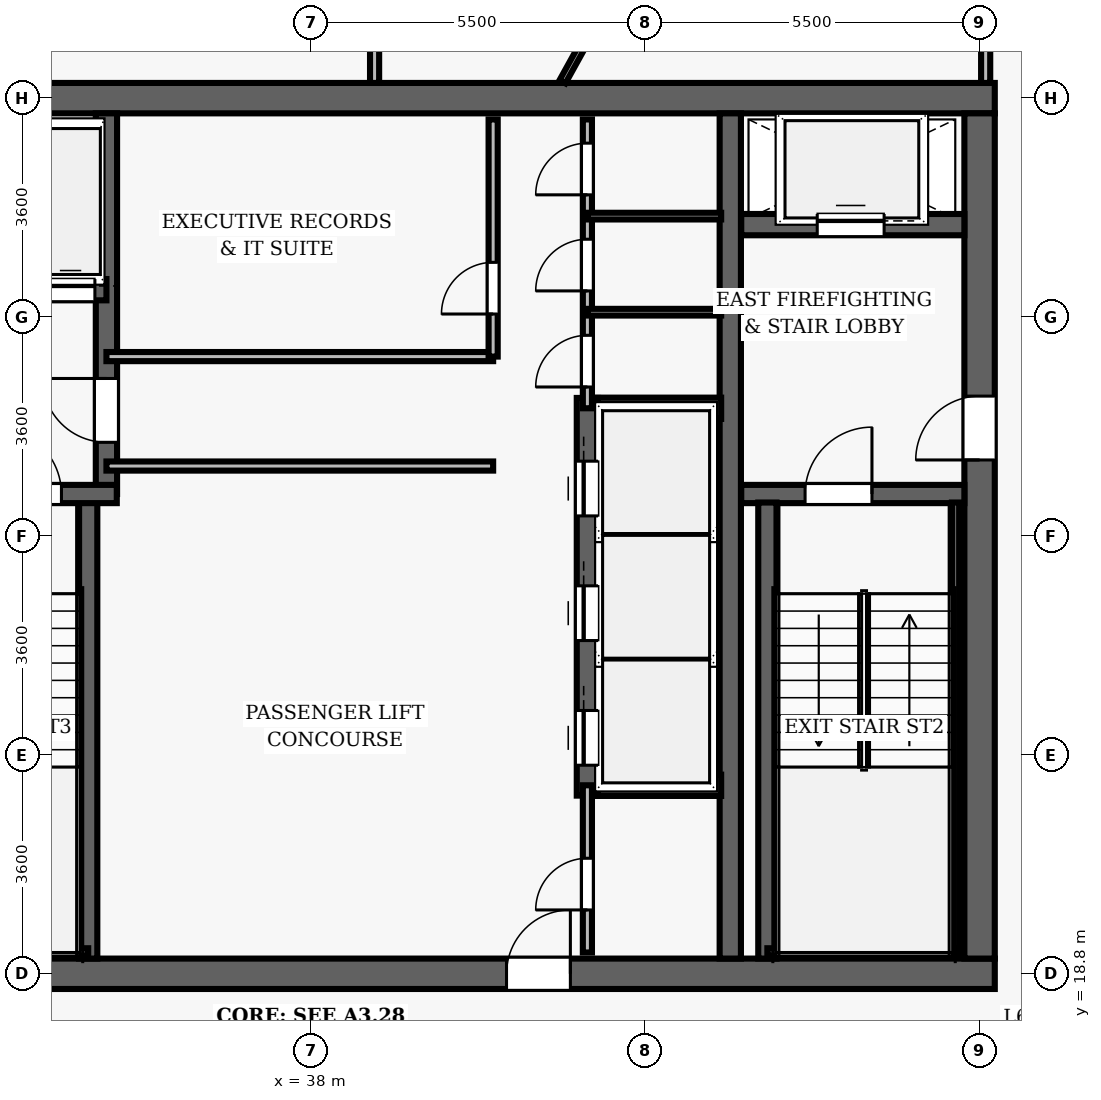
"""IFC4 building model, lengths in metres.
Left out: names, types, materials, properties, quantities, classifications, styles, units other than length and angle.
Written with IfcOpenShell. Run it as: python <this file> out.ifc"""

import sys

from ifc_helpers import new_model, si_unit, direction, frame, frame_2d, origin, place, context, subcontext, project, spatial, rectangle, extrude, element, fill, save


model = new_model("IFC4")
c1 = context("Model", 3, precision=1e-05, world=origin(), true_north=direction((0.0, 1.0)))
c2 = subcontext(c1, "Body", "Model", "MODEL_VIEW")
j1 = project(units=[si_unit("LENGTHUNIT", "METRE"), si_unit("PLANEANGLEUNIT", "RADIAN")], contexts=[c1])
p1 = place(None, origin())
s1 = spatial("IfcSite", under=j1, at=p1, CompositionType="ELEMENT")
p2 = place(p1, origin())
s2 = spatial("IfcBuilding", under=s1, at=p2, CompositionType="ELEMENT")
p3 = place(p2, frame((0.0, 0.0, 257.45)))
s3 = spatial("IfcBuildingStorey", under=s2, at=p3, CompositionType="ELEMENT", Elevation=257.45)
p4 = place(p3, frame((26.75, 18.8, 0.0), z_axis=(0.0, 0.0, 1.0), x_axis=(1.0, 0.0, 0.0)))
e1 = element("IfcWall", 1, at=p4, inside=s3, PredefinedType="SHEAR", context=c2, shape_type="SweptSolid", body=[
    extrude(rectangle(XDim=22.5, YDim=0.5, at=frame_2d((11.25, 0.0))), origin(), (0.0, 0.0, 1.0), 3.85),
])
p5 = place(p4, frame((14.47, 0.0, 0.0)))
e2 = element("IfcOpeningElement", 2, at=p5, cuts=e1, PredefinedType="OPENING", context=c2, shape_type="SweptSolid", body=[
    extrude(rectangle(XDim=1.05, YDim=2.15, at=frame_2d((0.525, 1.075))), frame((0.0, 0.26, 0.0), z_axis=(0.0, -1.0, 0.0), x_axis=(1.0, 0.0, 0.0)), (0.0, 0.0, 1.0), 0.52),
])
p6 = place(p3, frame((26.75, 33.2, 0.0), z_axis=(0.0, 0.0, 1.0), x_axis=(1.0, 0.0, 0.0)))
e3 = element("IfcWall", 3, at=p6, inside=s3, PredefinedType="SHEAR", context=c2, shape_type="SweptSolid", body=[
    extrude(rectangle(XDim=22.5, YDim=0.5, at=frame_2d((11.25, 0.0))), origin(), (0.0, 0.0, 1.0), 3.85),
])
p7 = place(p3, frame((49.0, 19.05, 0.0), z_axis=(0.0, 0.0, 1.0), x_axis=(0.0, 1.0, 0.0)))
e4 = element("IfcWall", 4, at=p7, inside=s3, PredefinedType="SHEAR", context=c2, shape_type="SweptSolid", body=[
    extrude(rectangle(XDim=13.9, YDim=0.5, at=frame_2d((6.95, 0.0))), origin(), (0.0, 0.0, 1.0), 3.85),
])
p8 = place(p7, frame((8.2, 0.0, 0.0)))
e5 = element("IfcOpeningElement", 5, at=p8, cuts=e4, PredefinedType="OPENING", context=c2, shape_type="SweptSolid", body=[
    extrude(rectangle(XDim=1.05, YDim=2.15, at=frame_2d((0.525, 1.075))), frame((0.0, 0.26, 0.0), z_axis=(0.0, -1.0, 0.0), x_axis=(1.0, 0.0, 0.0)), (0.0, 0.0, 1.0), 0.52),
])
p9 = place(p3, frame((44.9, 19.05, 0.0), z_axis=(0.0, 0.0, 1.0), x_axis=(0.0, 1.0, 0.0)))
e6 = element("IfcWall", 6, at=p9, inside=s3, PredefinedType="SHEAR", context=c2, shape_type="SweptSolid", body=[
    extrude(rectangle(XDim=13.9, YDim=0.35, at=frame_2d((6.95, 0.0))), origin(), (0.0, 0.0, 1.0), 3.85),
])
p10 = place(p3, frame((45.08, 26.69, 0.0), z_axis=(0.0, 0.0, 1.0), x_axis=(1.0, 0.0, 0.0)))
e7 = element("IfcWall", 7, at=p10, inside=s3, PredefinedType="SHEAR", context=c2, shape_type="SweptSolid", body=[
    extrude(rectangle(XDim=3.67, YDim=0.3, at=frame_2d((1.835, 0.0))), origin(), (0.0, 0.0, 1.0), 3.85),
])
p11 = place(p10, frame((1.05, 0.0, 0.0)))
e8 = element("IfcOpeningElement", 8, at=p11, cuts=e7, PredefinedType="OPENING", context=c2, shape_type="SweptSolid", body=[
    extrude(rectangle(XDim=1.1, YDim=2.15, at=frame_2d((0.55, 1.075))), frame((0.0, 0.16, 0.0), z_axis=(0.0, -1.0, 0.0), x_axis=(1.0, 0.0, 0.0)), (0.0, 0.0, 1.0), 0.32),
])
p12 = place(p3, frame((45.51, 19.05, 0.0), z_axis=(0.0, 0.0, 1.0), x_axis=(0.0, 1.0, 0.0)))
e9 = element("IfcWall", 9, at=p12, inside=s3, PredefinedType="SHEAR", context=c2, shape_type="SweptSolid", body=[
    extrude(rectangle(XDim=7.5, YDim=0.3, at=frame_2d((3.75, 0.0))), origin(), (0.0, 0.0, 1.0), 3.85),
])
p13 = place(p3, frame((48.605, 19.1, 0.0), z_axis=(0.0, 0.0, 1.0), x_axis=(0.0, 1.0, 0.0)))
e10 = element("IfcWall", 10, at=p13, inside=s3, PredefinedType="SHEAR", context=c2, shape_type="SweptSolid", body=[
    extrude(rectangle(XDim=7.45, YDim=0.12, at=frame_2d((3.725, 0.0))), origin(), (0.0, 0.0, 1.0), 3.85),
])
p14 = place(p3, frame((45.51, 19.16, 0.0), z_axis=(0.0, 0.0, 1.0), x_axis=(1.0, 0.0, 0.0)))
e11 = element("IfcWall", 11, at=p14, inside=s3, PredefinedType="SHEAR", context=c2, shape_type="SweptSolid", body=[
    extrude(rectangle(XDim=3.095, YDim=0.12, at=frame_2d((1.547, 0.0))), origin(), (0.0, 0.0, 1.0), 3.85),
])
p15 = place(p3, frame((45.08, 31.12, 0.0), z_axis=(0.0, 0.0, 1.0), x_axis=(1.0, 0.0, 0.0)))
e12 = element("IfcWall", 12, at=p15, inside=s3, PredefinedType="SHEAR", context=c2, shape_type="SweptSolid", body=[
    extrude(rectangle(XDim=3.67, YDim=0.35, at=frame_2d((1.835, 0.0))), origin(), (0.0, 0.0, 1.0), 3.04),
])
p16 = place(p15, frame((1.25, 0.0, 0.0)))
e13 = element("IfcOpeningElement", 13, at=p16, cuts=e12, PredefinedType="OPENING", context=c2, shape_type="SweptSolid", body=[
    extrude(rectangle(XDim=1.1, YDim=2.15, at=frame_2d((0.55, 1.075))), frame((0.0, 0.185, 0.0), z_axis=(0.0, -1.0, 0.0), x_axis=(1.0, 0.0, 0.0)), (0.0, 0.0, 1.0), 0.37),
])
p17 = place(p3, frame((34.34, 19.05, 0.0), z_axis=(0.0, 0.0, 1.0), x_axis=(0.0, 1.0, 0.0)))
e14 = element("IfcWall", 14, at=p17, inside=s3, PredefinedType="SHEAR", context=c2, shape_type="SweptSolid", body=[
    extrude(rectangle(XDim=7.5, YDim=0.3, at=frame_2d((3.75, 0.0))), origin(), (0.0, 0.0, 1.0), 3.85),
])
p18 = place(p3, frame((34.64, 26.69, 0.0), z_axis=(0.0, 0.0, 1.0), x_axis=(0.0, 1.0, 0.0)))
e15 = element("IfcWall", 15, at=p18, inside=s3, PredefinedType="SHEAR", context=c2, shape_type="SweptSolid", body=[
    extrude(rectangle(XDim=6.26, YDim=0.35, at=frame_2d((3.13, 0.0))), origin(), (0.0, 0.0, 1.0), 3.85),
])
p19 = place(p18, frame((0.85, 0.0, 0.0)))
e16 = element("IfcOpeningElement", 16, at=p19, cuts=e15, PredefinedType="OPENING", context=c2, shape_type="SweptSolid", body=[
    extrude(rectangle(XDim=1.05, YDim=2.15, at=frame_2d((0.525, 1.075))), frame((0.0, 0.185, 0.0), z_axis=(0.0, -1.0, 0.0), x_axis=(1.0, 0.0, 0.0)), (0.0, 0.0, 1.0), 0.37),
])
p20 = place(p3, frame((31.25, 26.69, 0.0), z_axis=(0.0, 0.0, 1.0), x_axis=(1.0, 0.0, 0.0)))
e17 = element("IfcWall", 17, at=p20, inside=s3, PredefinedType="SHEAR", context=c2, shape_type="SweptSolid", body=[
    extrude(rectangle(XDim=3.56, YDim=0.3, at=frame_2d((1.78, 0.0))), origin(), (0.0, 0.0, 1.0), 3.85),
])
p21 = place(p20, frame((1.55, 0.0, 0.0)))
e18 = element("IfcOpeningElement", 18, at=p21, cuts=e17, PredefinedType="OPENING", context=c2, shape_type="SweptSolid", body=[
    extrude(rectangle(XDim=1.1, YDim=2.15, at=frame_2d((0.55, 1.075))), frame((0.0, 0.16, 0.0), z_axis=(0.0, -1.0, 0.0), x_axis=(1.0, 0.0, 0.0)), (0.0, 0.0, 1.0), 0.32),
])
p22 = place(p3, frame((31.3, 19.16, 0.0), z_axis=(0.0, 0.0, 1.0), x_axis=(1.0, 0.0, 0.0)))
e19 = element("IfcWall", 19, at=p22, inside=s3, PredefinedType="SHEAR", context=c2, shape_type="SweptSolid", body=[
    extrude(rectangle(XDim=3.04, YDim=0.12, at=frame_2d((1.52, 0.0))), origin(), (0.0, 0.0, 1.0), 3.85),
])
p23 = place(p3, frame((32.23, 30.05, 0.0), z_axis=(0.0, 0.0, 1.0), x_axis=(1.0, 0.0, 0.0)))
e20 = element("IfcWall", 20, at=p23, inside=s3, PredefinedType="SHEAR", context=c2, shape_type="SweptSolid", body=[
    extrude(rectangle(XDim=2.41, YDim=0.35, at=frame_2d((1.205, 0.0))), origin(), (0.0, 0.0, 1.0), 3.04),
])
p24 = place(p23, frame((0.42, 0.0, 0.0)))
e21 = element("IfcOpeningElement", 21, at=p24, cuts=e20, PredefinedType="OPENING", context=c2, shape_type="SweptSolid", body=[
    extrude(rectangle(XDim=0.8, YDim=2.15, at=frame_2d((0.4, 1.075))), frame((0.0, 0.185, 0.0), z_axis=(0.0, -1.0, 0.0), x_axis=(1.0, 0.0, 0.0)), (0.0, 0.0, 1.0), 0.37),
])
p25 = place(p23, frame((1.42, 0.0, 0.0)))
e22 = element("IfcOpeningElement", 22, at=p25, cuts=e20, PredefinedType="OPENING", context=c2, shape_type="SweptSolid", body=[
    extrude(rectangle(XDim=0.8, YDim=2.15, at=frame_2d((0.4, 1.075))), frame((0.0, 0.185, 0.0), z_axis=(0.0, -1.0, 0.0), x_axis=(1.0, 0.0, 0.0)), (0.0, 0.0, 1.0), 0.37),
])
p26 = place(p3, frame((42.55, 21.73, 0.0), z_axis=(0.0, 0.0, 1.0), x_axis=(0.0, 1.0, 0.0)))
e23 = element("IfcWall", 23, at=p26, inside=s3, PredefinedType="SHEAR", context=c2, shape_type="SweptSolid", body=[
    extrude(rectangle(XDim=6.54, YDim=0.35, at=frame_2d((3.27, 0.0))), origin(), (0.0, 0.0, 1.0), 3.04),
])
p27 = place(p26, frame((0.5, 0.0, 0.0)))
e24 = element("IfcOpeningElement", 24, at=p27, cuts=e23, PredefinedType="OPENING", context=c2, shape_type="SweptSolid", body=[
    extrude(rectangle(XDim=0.9, YDim=2.15, at=frame_2d((0.45, 1.075))), frame((0.0, 0.185, 0.0), z_axis=(0.0, -1.0, 0.0), x_axis=(1.0, 0.0, 0.0)), (0.0, 0.0, 1.0), 0.37),
])
p28 = place(p26, frame((2.55, 0.0, 0.0)))
e25 = element("IfcOpeningElement", 25, at=p28, cuts=e23, PredefinedType="OPENING", context=c2, shape_type="SweptSolid", body=[
    extrude(rectangle(XDim=0.9, YDim=2.15, at=frame_2d((0.45, 1.075))), frame((0.0, 0.185, 0.0), z_axis=(0.0, -1.0, 0.0), x_axis=(1.0, 0.0, 0.0)), (0.0, 0.0, 1.0), 0.37),
])
p29 = place(p26, frame((4.6, 0.0, 0.0)))
e26 = element("IfcOpeningElement", 26, at=p29, cuts=e23, PredefinedType="OPENING", context=c2, shape_type="SweptSolid", body=[
    extrude(rectangle(XDim=0.9, YDim=2.15, at=frame_2d((0.45, 1.075))), frame((0.0, 0.185, 0.0), z_axis=(0.0, -1.0, 0.0), x_axis=(1.0, 0.0, 0.0)), (0.0, 0.0, 1.0), 0.37),
])
for number, where, z_axis, x_axis in (
    (27, (42.72, 21.9, 0.0), (0.0, 0.0, 1.0), (1.0, 0.0, 0.0)),
    (28, (42.72, 28.1, 0.0), (0.0, 0.0, 1.0), (1.0, 0.0, 0.0)),
):
    element("IfcWall", number, at=place(p3, frame(where, z_axis=z_axis, x_axis=x_axis)), inside=s3, PredefinedType="SHEAR", context=c2, shape_type="SweptSolid", body=[
        extrude(rectangle(XDim=2.03, YDim=0.35, at=frame_2d((1.015, 0.0))), origin(), (0.0, 0.0, 1.0), 3.04),
    ])
for number, where, z_axis, x_axis in (
    (29, (34.64, 27.15, 0.0), (0.0, 0.0, 1.0), (1.0, 0.0, 0.0)),
    (30, (34.64, 28.95, 0.0), (0.0, 0.0, 1.0), (1.0, 0.0, 0.0)),
):
    element("IfcWall", number, at=place(p3, frame(where, z_axis=z_axis, x_axis=x_axis)), inside=s3, PredefinedType="PARTITIONING", context=c2, shape_type="SweptSolid", body=[
        extrude(rectangle(XDim=6.36, YDim=0.15, at=frame_2d((3.18, 0.0))), origin(), (0.0, 0.0, 1.0), 3.04),
    ])
p30 = place(p3, frame((41.0, 28.95, 0.0), z_axis=(0.0, 0.0, 1.0), x_axis=(0.0, 1.0, 0.0)))
e31 = element("IfcWall", 31, at=p30, inside=s3, PredefinedType="PARTITIONING", context=c2, shape_type="SweptSolid", body=[
    extrude(rectangle(XDim=3.9, YDim=0.15, at=frame_2d((1.95, 0.0))), origin(), (0.0, 0.0, 1.0), 3.04),
])
p31 = place(p30, frame((0.7, 0.0, 0.0)))
e32 = element("IfcOpeningElement", 32, at=p31, cuts=e31, PredefinedType="OPENING", context=c2, shape_type="SweptSolid", body=[
    extrude(rectangle(XDim=0.85, YDim=2.1, at=frame_2d((0.425, 1.05))), frame((0.0, 0.085, 0.0), z_axis=(0.0, -1.0, 0.0), x_axis=(1.0, 0.0, 0.0)), (0.0, 0.0, 1.0), 0.17),
])
p32 = place(p3, frame((42.55, 28.1, 0.0), z_axis=(0.0, 0.0, 1.0), x_axis=(0.0, 1.0, 0.0)))
e33 = element("IfcWall", 33, at=p32, inside=s3, PredefinedType="PARTITIONING", context=c2, shape_type="SweptSolid", body=[
    extrude(rectangle(XDim=4.75, YDim=0.15, at=frame_2d((2.375, 0.0))), origin(), (0.0, 0.0, 1.0), 3.04),
])
p33 = place(p32, frame((0.35, 0.0, 0.0)))
e34 = element("IfcOpeningElement", 34, at=p33, cuts=e33, PredefinedType="OPENING", context=c2, shape_type="SweptSolid", body=[
    extrude(rectangle(XDim=0.85, YDim=2.1, at=frame_2d((0.425, 1.05))), frame((0.0, 0.085, 0.0), z_axis=(0.0, -1.0, 0.0), x_axis=(1.0, 0.0, 0.0)), (0.0, 0.0, 1.0), 0.17),
])
p34 = place(p32, frame((1.93, 0.0, 0.0)))
e35 = element("IfcOpeningElement", 35, at=p34, cuts=e33, PredefinedType="OPENING", context=c2, shape_type="SweptSolid", body=[
    extrude(rectangle(XDim=0.85, YDim=2.1, at=frame_2d((0.425, 1.05))), frame((0.0, 0.085, 0.0), z_axis=(0.0, -1.0, 0.0), x_axis=(1.0, 0.0, 0.0)), (0.0, 0.0, 1.0), 0.17),
])
p35 = place(p32, frame((3.51, 0.0, 0.0)))
e36 = element("IfcOpeningElement", 36, at=p35, cuts=e33, PredefinedType="OPENING", context=c2, shape_type="SweptSolid", body=[
    extrude(rectangle(XDim=0.85, YDim=2.1, at=frame_2d((0.425, 1.05))), frame((0.0, 0.085, 0.0), z_axis=(0.0, -1.0, 0.0), x_axis=(1.0, 0.0, 0.0)), (0.0, 0.0, 1.0), 0.17),
])
for number, where, z_axis, x_axis in (
    (37, (42.55, 29.68, 0.0), (0.0, 0.0, 1.0), (1.0, 0.0, 0.0)),
    (38, (42.55, 31.26, 0.0), (0.0, 0.0, 1.0), (1.0, 0.0, 0.0)),
):
    element("IfcWall", number, at=place(p3, frame(where, z_axis=z_axis, x_axis=x_axis)), inside=s3, PredefinedType="PARTITIONING", context=c2, shape_type="SweptSolid", body=[
        extrude(rectangle(XDim=2.2, YDim=0.11, at=frame_2d((1.1, 0.0))), origin(), (0.0, 0.0, 1.0), 3.04),
    ])
p36 = place(p3, frame((42.55, 19.15, 0.0), z_axis=(0.0, 0.0, 1.0), x_axis=(0.0, 1.0, 0.0)))
e39 = element("IfcWall", 39, at=p36, inside=s3, PredefinedType="PARTITIONING", context=c2, shape_type="SweptSolid", body=[
    extrude(rectangle(XDim=2.75, YDim=0.15, at=frame_2d((1.375, 0.0))), origin(), (0.0, 0.0, 1.0), 3.04),
])
p37 = place(p36, frame((0.7, 0.0, 0.0)))
e40 = element("IfcOpeningElement", 40, at=p37, cuts=e39, PredefinedType="OPENING", context=c2, shape_type="SweptSolid", body=[
    extrude(rectangle(XDim=0.85, YDim=2.1, at=frame_2d((0.425, 1.05))), frame((0.0, 0.085, 0.0), z_axis=(0.0, -1.0, 0.0), x_axis=(1.0, 0.0, 0.0)), (0.0, 0.0, 1.0), 0.17),
])
p38 = place(p3, frame((49.1, 33.45, 0.0), z_axis=(0.0, 0.0, 1.0), x_axis=(0.0, 1.0, 0.0)))
e41 = element("IfcWall", 41, at=p38, inside=s3, PredefinedType="PARTITIONING", context=c2, shape_type="SweptSolid", body=[
    extrude(rectangle(XDim=7.95, YDim=0.15, at=frame_2d((3.975, 0.0))), origin(), (0.0, 0.0, 1.0), 3.04),
])
p39 = place(p38, frame((2.308, 0.0, 0.0)))
e42 = element("IfcOpeningElement", 42, at=p39, cuts=e41, PredefinedType="OPENING", context=c2, shape_type="SweptSolid", body=[
    extrude(rectangle(XDim=0.95, YDim=2.15, at=frame_2d((0.475, 1.075))), frame((0.0, 0.085, 0.0), z_axis=(0.0, -1.0, 0.0), x_axis=(1.0, 0.0, 0.0)), (0.0, 0.0, 1.0), 0.17),
])
p40 = place(p3, frame((39.05, 33.45, 0.0), z_axis=(0.0, 0.0, 1.0), x_axis=(0.0, 1.0, 0.0)))
e43 = element("IfcWall", 43, at=p40, inside=s3, PredefinedType="PARTITIONING", context=c2, shape_type="SweptSolid", body=[
    extrude(rectangle(XDim=6.95, YDim=0.15, at=frame_2d((3.475, 0.0))), origin(), (0.0, 0.0, 1.0), 3.04),
])
p41 = place(p40, frame((1.262, 0.0, 0.0)))
e44 = element("IfcOpeningElement", 44, at=p41, cuts=e43, PredefinedType="OPENING", context=c2, shape_type="SweptSolid", body=[
    extrude(rectangle(XDim=0.95, YDim=2.15, at=frame_2d((0.475, 1.075))), frame((0.0, 0.085, 0.0), z_axis=(0.0, -1.0, 0.0), x_axis=(1.0, 0.0, 0.0)), (0.0, 0.0, 1.0), 0.17),
])
p42 = place(p3, frame((42.141, 33.47, 0.0), z_axis=(0.0, 0.0, 1.0), x_axis=(0.484814100985, 0.87461722341, 0.0)))
e45 = element("IfcWall", 45, at=p42, inside=s3, PredefinedType="PARTITIONING", context=c2, shape_type="SweptSolid", body=[
    extrude(rectangle(XDim=12.958, YDim=0.11, at=frame_2d((6.479, 0.0))), origin(), (0.0, 0.0, 1.0), 3.04),
])
p43 = place(p11, origin())
e46 = element("IfcDoor", 46, at=p43, inside=s3, OperationType="SINGLE_SWING_RIGHT", PredefinedType="DOOR", context=c2, shape_type="SweptSolid", body=[
    extrude(rectangle(XDim=1.1, YDim=2.15, at=frame_2d((0.55, 1.075))), frame((0.0, 0.025, 0.0), z_axis=(0.0, -1.0, 0.0), x_axis=(1.0, 0.0, 0.0)), (0.0, 0.0, 1.0), 0.05),
])
fill(e8, e46)
p44 = place(p8, origin())
e47 = element("IfcDoor", 47, at=p44, inside=s3, OperationType="SINGLE_SWING_LEFT", PredefinedType="DOOR", context=c2, shape_type="SweptSolid", body=[
    extrude(rectangle(XDim=1.05, YDim=2.15, at=frame_2d((0.525, 1.075))), frame((0.0, 0.025, 0.0), z_axis=(0.0, -1.0, 0.0), x_axis=(1.0, 0.0, 0.0)), (0.0, 0.0, 1.0), 0.05),
])
fill(e5, e47)
p45 = place(p21, origin())
e48 = element("IfcDoor", 48, at=p45, inside=s3, OperationType="SINGLE_SWING_LEFT", PredefinedType="DOOR", context=c2, shape_type="SweptSolid", body=[
    extrude(rectangle(XDim=1.1, YDim=2.15, at=frame_2d((0.55, 1.075))), frame((0.0, 0.025, 0.0), z_axis=(0.0, -1.0, 0.0), x_axis=(1.0, 0.0, 0.0)), (0.0, 0.0, 1.0), 0.05),
])
fill(e18, e48)
p46 = place(p5, origin())
e49 = element("IfcDoor", 49, at=p46, inside=s3, OperationType="SINGLE_SWING_RIGHT", PredefinedType="DOOR", context=c2, shape_type="SweptSolid", body=[
    extrude(rectangle(XDim=1.05, YDim=2.15, at=frame_2d((0.525, 1.075))), frame((0.0, 0.025, 0.0), z_axis=(0.0, -1.0, 0.0), x_axis=(1.0, 0.0, 0.0)), (0.0, 0.0, 1.0), 0.05),
])
fill(e2, e49)
p47 = place(p19, origin())
e50 = element("IfcDoor", 50, at=p47, inside=s3, OperationType="SINGLE_SWING_RIGHT", PredefinedType="DOOR", context=c2, shape_type="SweptSolid", body=[
    extrude(rectangle(XDim=1.05, YDim=2.15, at=frame_2d((0.525, 1.075))), frame((0.0, 0.025, 0.0), z_axis=(0.0, -1.0, 0.0), x_axis=(1.0, 0.0, 0.0)), (0.0, 0.0, 1.0), 0.05),
])
fill(e16, e50)
p48 = place(p31, origin())
e51 = element("IfcDoor", 51, at=p48, inside=s3, OperationType="SINGLE_SWING_LEFT", PredefinedType="DOOR", context=c2, shape_type="SweptSolid", body=[
    extrude(rectangle(XDim=0.85, YDim=2.1, at=frame_2d((0.425, 1.05))), frame((0.0, 0.025, 0.0), z_axis=(0.0, -1.0, 0.0), x_axis=(1.0, 0.0, 0.0)), (0.0, 0.0, 1.0), 0.05),
])
fill(e32, e51)
p49 = place(p33, origin())
e52 = element("IfcDoor", 52, at=p49, inside=s3, OperationType="SINGLE_SWING_LEFT", PredefinedType="DOOR", context=c2, shape_type="SweptSolid", body=[
    extrude(rectangle(XDim=0.85, YDim=2.1, at=frame_2d((0.425, 1.05))), frame((0.0, 0.025, 0.0), z_axis=(0.0, -1.0, 0.0), x_axis=(1.0, 0.0, 0.0)), (0.0, 0.0, 1.0), 0.05),
])
fill(e34, e52)
p50 = place(p34, origin())
e53 = element("IfcDoor", 53, at=p50, inside=s3, OperationType="SINGLE_SWING_LEFT", PredefinedType="DOOR", context=c2, shape_type="SweptSolid", body=[
    extrude(rectangle(XDim=0.85, YDim=2.1, at=frame_2d((0.425, 1.05))), frame((0.0, 0.025, 0.0), z_axis=(0.0, -1.0, 0.0), x_axis=(1.0, 0.0, 0.0)), (0.0, 0.0, 1.0), 0.05),
])
fill(e35, e53)
p51 = place(p35, origin())
e54 = element("IfcDoor", 54, at=p51, inside=s3, OperationType="SINGLE_SWING_LEFT", PredefinedType="DOOR", context=c2, shape_type="SweptSolid", body=[
    extrude(rectangle(XDim=0.85, YDim=2.1, at=frame_2d((0.425, 1.05))), frame((0.0, 0.025, 0.0), z_axis=(0.0, -1.0, 0.0), x_axis=(1.0, 0.0, 0.0)), (0.0, 0.0, 1.0), 0.05),
])
fill(e36, e54)
p52 = place(p37, origin())
e55 = element("IfcDoor", 55, at=p52, inside=s3, OperationType="SINGLE_SWING_LEFT", PredefinedType="DOOR", context=c2, shape_type="SweptSolid", body=[
    extrude(rectangle(XDim=0.85, YDim=2.1, at=frame_2d((0.425, 1.05))), frame((0.0, 0.025, 0.0), z_axis=(0.0, -1.0, 0.0), x_axis=(1.0, 0.0, 0.0)), (0.0, 0.0, 1.0), 0.05),
])
fill(e40, e55)
p53 = place(p27, origin())
e56 = element("IfcDoor", 56, at=p53, inside=s3, OperationType="SLIDING_TO_LEFT", PredefinedType="DOOR", context=c2, shape_type="SweptSolid", body=[
    extrude(rectangle(XDim=0.9, YDim=2.15, at=frame_2d((0.45, 1.075))), frame((0.0, 0.025, 0.0), z_axis=(0.0, -1.0, 0.0), x_axis=(1.0, 0.0, 0.0)), (0.0, 0.0, 1.0), 0.05),
])
fill(e24, e56)
p54 = place(p28, origin())
e57 = element("IfcDoor", 57, at=p54, inside=s3, OperationType="SLIDING_TO_LEFT", PredefinedType="DOOR", context=c2, shape_type="SweptSolid", body=[
    extrude(rectangle(XDim=0.9, YDim=2.15, at=frame_2d((0.45, 1.075))), frame((0.0, 0.025, 0.0), z_axis=(0.0, -1.0, 0.0), x_axis=(1.0, 0.0, 0.0)), (0.0, 0.0, 1.0), 0.05),
])
fill(e25, e57)
p55 = place(p29, origin())
e58 = element("IfcDoor", 58, at=p55, inside=s3, OperationType="SLIDING_TO_LEFT", PredefinedType="DOOR", context=c2, shape_type="SweptSolid", body=[
    extrude(rectangle(XDim=0.9, YDim=2.15, at=frame_2d((0.45, 1.075))), frame((0.0, 0.025, 0.0), z_axis=(0.0, -1.0, 0.0), x_axis=(1.0, 0.0, 0.0)), (0.0, 0.0, 1.0), 0.05),
])
fill(e26, e58)
p56 = place(p16, origin())
e59 = element("IfcDoor", 59, at=p56, inside=s3, OperationType="SLIDING_TO_LEFT", PredefinedType="DOOR", context=c2, shape_type="SweptSolid", body=[
    extrude(rectangle(XDim=1.1, YDim=2.15, at=frame_2d((0.55, 1.075))), frame((0.0, 0.025, 0.0), z_axis=(0.0, -1.0, 0.0), x_axis=(1.0, 0.0, 0.0)), (0.0, 0.0, 1.0), 0.05),
])
fill(e13, e59)
p57 = place(p25, origin())
e60 = element("IfcDoor", 60, at=p57, inside=s3, OperationType="SLIDING_TO_LEFT", PredefinedType="DOOR", context=c2, shape_type="SweptSolid", body=[
    extrude(rectangle(XDim=0.8, YDim=2.15, at=frame_2d((0.4, 1.075))), frame((0.0, 0.025, 0.0), z_axis=(0.0, -1.0, 0.0), x_axis=(1.0, 0.0, 0.0)), (0.0, 0.0, 1.0), 0.05),
])
fill(e22, e60)
save(model, sys.argv[1])
